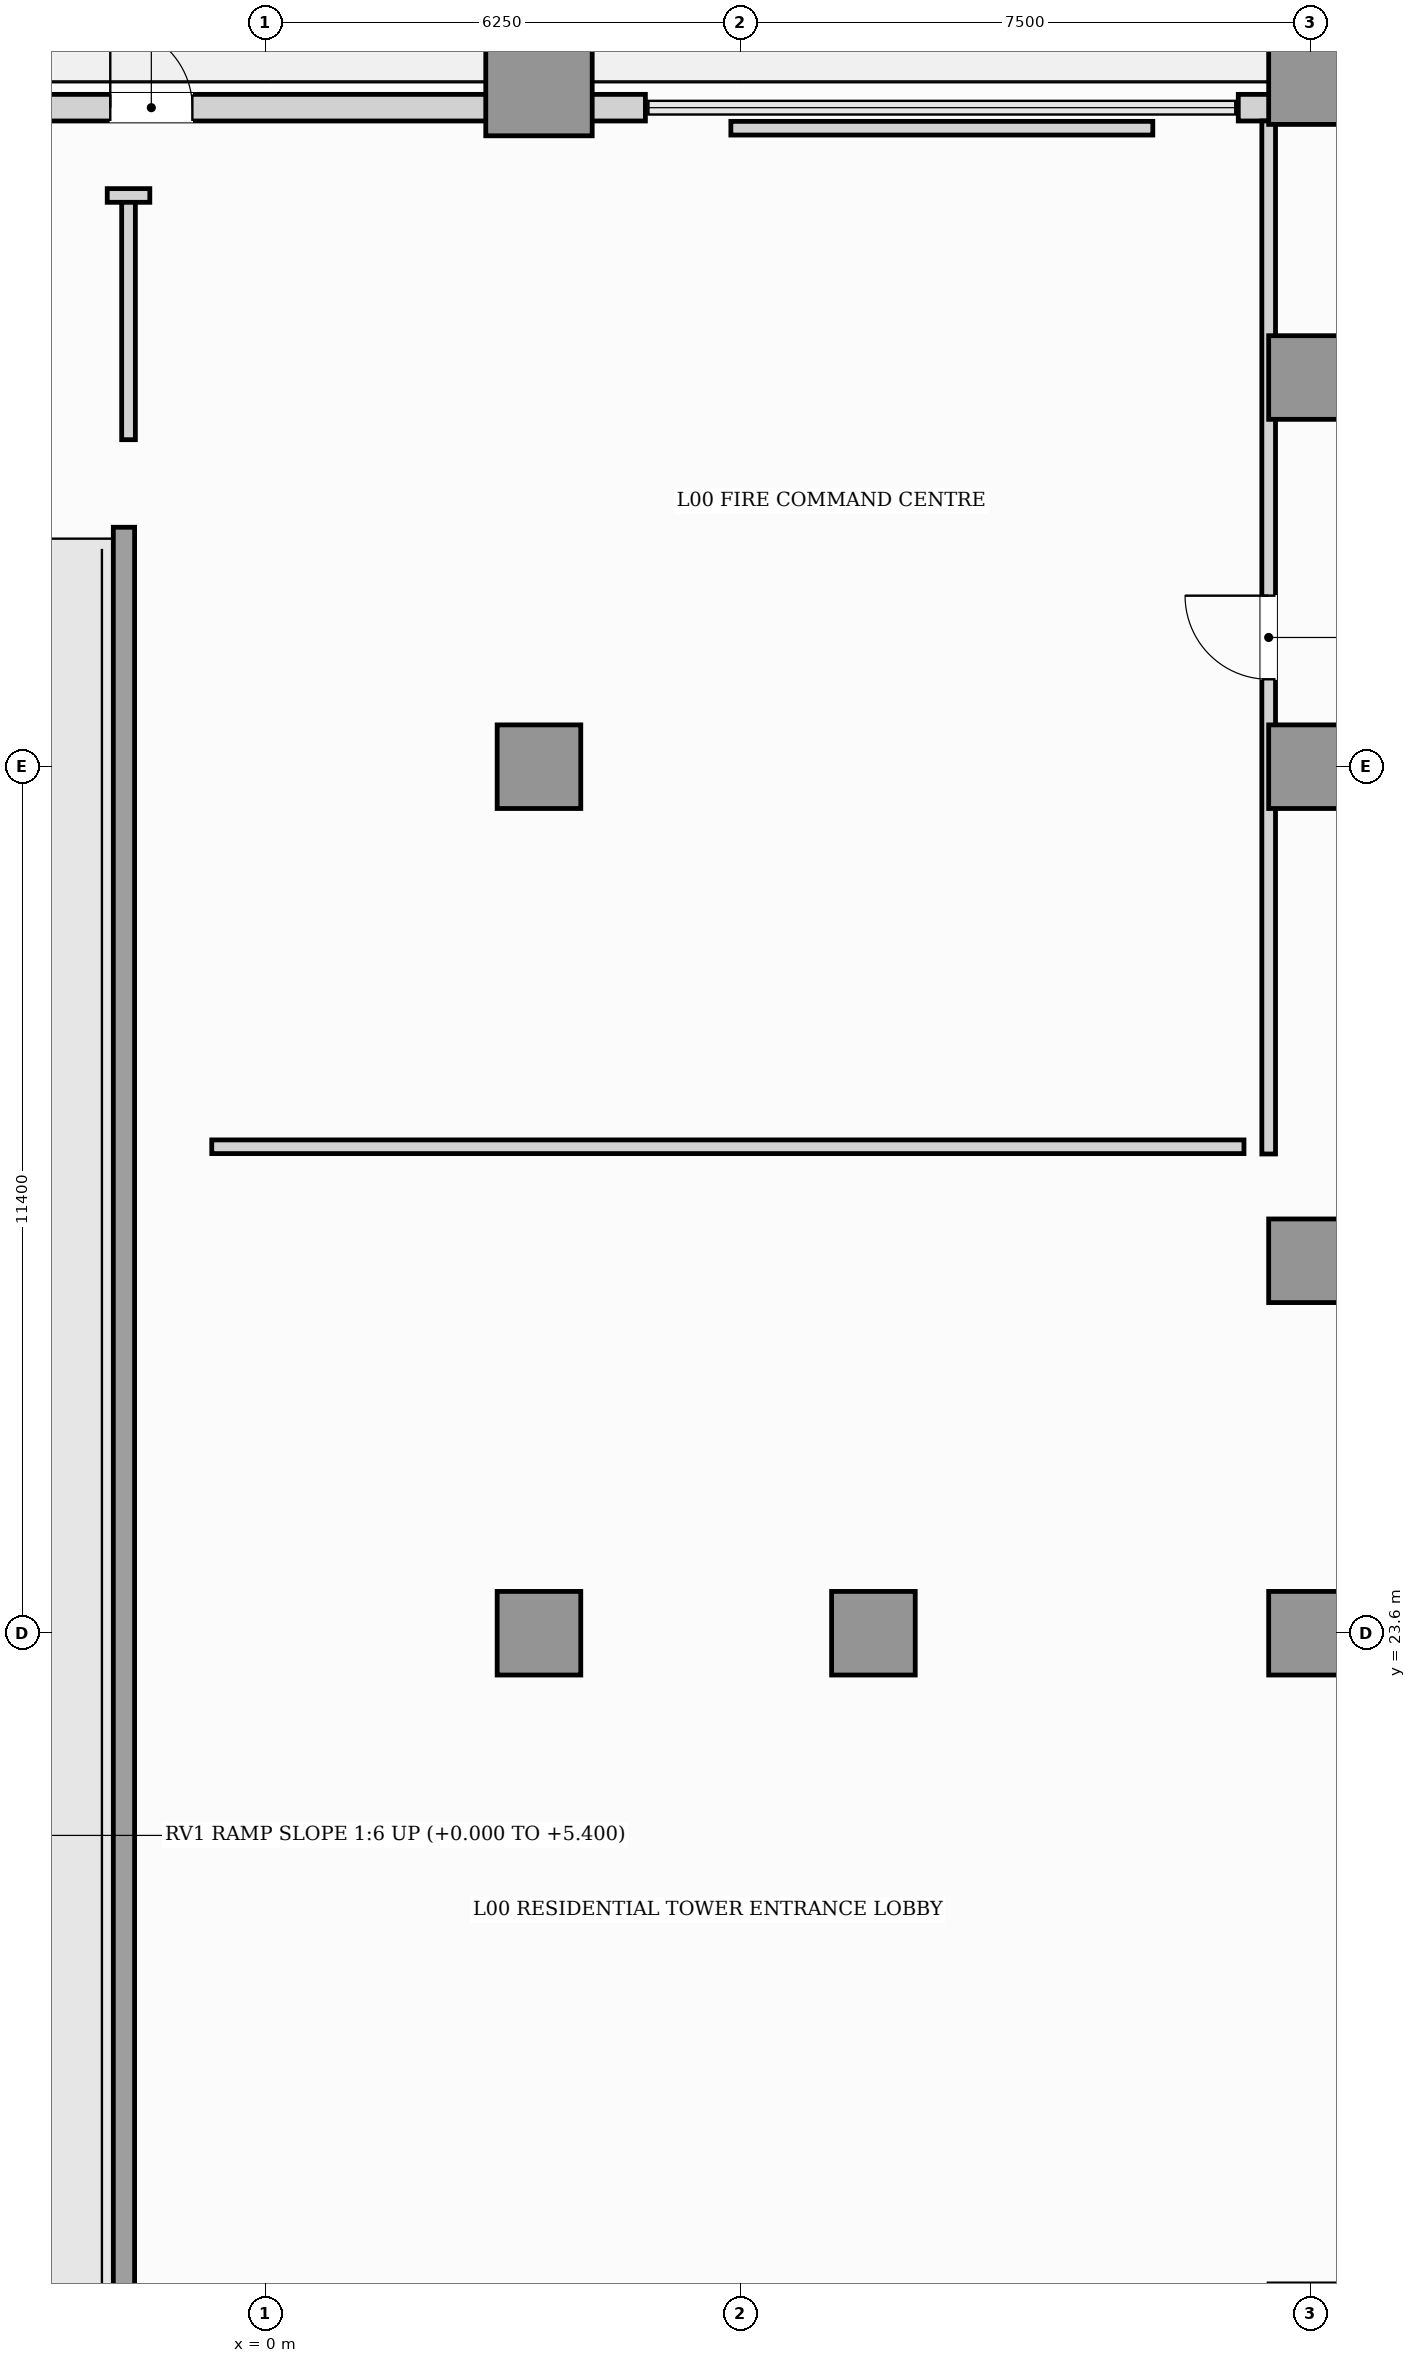
"""IFC4 building model, lengths in metres.
Left out: names, types, materials, properties, quantities, classifications, styles, units other than length and angle.
Written with IfcOpenShell. Run it as: python <this file> out.ifc"""

import sys

from ifc_helpers import new_model, si_unit, direction, frame, frame_2d, origin, origin_2d, place, context, subcontext, project, spatial, rectangle, hollow_rectangle, extrude, element, fill, save


model = new_model("IFC4")
c1 = context("Model", 3, precision=1e-05, world=origin(), true_north=direction((0.0, 1.0)))
c2 = subcontext(c1, "Body", "Model", "MODEL_VIEW")
j1 = project(units=[si_unit("LENGTHUNIT", "METRE"), si_unit("PLANEANGLEUNIT", "RADIAN")], contexts=[c1])
p1 = place(None, origin())
s1 = spatial("IfcSite", under=j1, at=p1, CompositionType="ELEMENT")
p2 = place(p1, origin())
s2 = spatial("IfcBuilding", under=s1, at=p2, CompositionType="ELEMENT")
p3 = place(p2, origin())
s3 = spatial("IfcBuildingStorey", under=s2, at=p3, CompositionType="ELEMENT", Elevation=0.0)
p4 = place(p3, frame((-1.86, 3.88, 0.0), z_axis=(0.0, 0.0, 1.0), x_axis=(0.0, 1.0, 0.0)))
e1 = element("IfcWall", 1, at=p4, inside=s3, PredefinedType="SHEAR", context=c2, shape_type="SweptSolid", body=[
    extrude(rectangle(XDim=34.27, YDim=0.28, at=frame_2d((17.135, 0.0))), origin(), (0.0, 0.0, 1.0), 5.1),
])
p5 = place(p3, frame((3.6, 44.0, 0.0), z_axis=(0.0, 0.0, 1.0), x_axis=(1.0, 0.0, 0.0)))
e2 = element("IfcColumn", 2, at=p5, inside=s3, PredefinedType="USERDEFINED", context=c2, shape_type="SweptSolid", body=[
    extrude(hollow_rectangle(XDim=1.4, YDim=1.4, WallThickness=0.08, at=origin_2d()), origin(), (0.0, 0.0, 1.0), 5.4),
])
for number, where, z_axis, x_axis in (
    (3, (3.6, 23.6, 0.0), (0.0, 0.0, 1.0), (1.0, 0.0, 0.0)),
    (4, (3.6, 35.0, 0.0), (0.0, 0.0, 1.0), (1.0, 0.0, 0.0)),
    (5, (13.75, 23.6, 0.0), (0.0, 0.0, 1.0), (1.0, 0.0, 0.0)),
    (6, (13.75, 35.0, 0.0), (0.0, 0.0, 1.0), (1.0, 0.0, 0.0)),
    (7, (13.75, 44.0, 0.0), (0.0, 0.0, 1.0), (1.0, 0.0, 0.0)),
    (8, (8.0, 23.6, 0.0), (0.0, 0.0, 1.0), (1.0, 0.0, 0.0)),
    (9, (13.75, 28.5, 0.0), (0.0, 0.0, 1.0), (1.0, 0.0, 0.0)),
    (10, (13.75, 40.12, 0.0), (0.0, 0.0, 1.0), (1.0, 0.0, 0.0)),
):
    element("IfcColumn", number, at=place(p3, frame(where, z_axis=z_axis, x_axis=x_axis)), inside=s3, PredefinedType="COLUMN", context=c2, shape_type="SweptSolid", body=[
        extrude(rectangle(XDim=1.1, YDim=1.1, at=origin_2d()), origin(), (0.0, 0.0, 1.0), 5.4),
    ])
p6 = place(p3, frame((-8.06, 43.67, 0.0), z_axis=(0.0, 0.0, 1.0), x_axis=(1.0, 0.0, 0.0)))
e11 = element("IfcWall", 11, at=p6, inside=s3, PredefinedType="SOLIDWALL", context=c2, shape_type="SweptSolid", body=[
    extrude(rectangle(XDim=13.06, YDim=0.35, at=frame_2d((6.53, 0.0))), origin(), (0.0, 0.0, 1.0), 4.2),
])
p7 = place(p6, frame((6.02, 0.0, 0.0)))
e12 = element("IfcOpeningElement", 12, at=p7, cuts=e11, PredefinedType="OPENING", context=c2, shape_type="SweptSolid", body=[
    extrude(rectangle(XDim=1.08, YDim=2.25, at=frame_2d((0.54, 1.125))), frame((0.0, 0.185, 0.0), z_axis=(0.0, -1.0, 0.0), x_axis=(1.0, 0.0, 0.0)), (0.0, 0.0, 1.0), 0.37),
])
p8 = place(p3, frame((12.8, 43.67, 0.0), z_axis=(0.0, 0.0, 1.0), x_axis=(1.0, 0.0, 0.0)))
e13 = element("IfcWall", 13, at=p8, inside=s3, PredefinedType="SOLIDWALL", context=c2, shape_type="SweptSolid", body=[
    extrude(rectangle(XDim=1.9, YDim=0.35, at=frame_2d((0.95, 0.0))), origin(), (0.0, 0.0, 1.0), 4.483),
])
p9 = place(p3, frame((13.2, 29.905, 0.0), z_axis=(0.0, 0.0, 1.0), x_axis=(0.0, 1.0, 0.0)))
e14 = element("IfcWall", 14, at=p9, inside=s3, PredefinedType="PARTITIONING", context=c2, shape_type="SweptSolid", body=[
    extrude(rectangle(XDim=13.59, YDim=0.18, at=frame_2d((6.795, 0.0))), origin(), (0.0, 0.0, 1.0), 5.1),
])
p10 = place(p9, frame((6.245, 0.0, 0.0)))
e15 = element("IfcOpeningElement", 15, at=p10, cuts=e14, PredefinedType="OPENING", context=c2, shape_type="SweptSolid", body=[
    extrude(rectangle(XDim=1.1, YDim=2.2, at=frame_2d((0.55, 1.1))), frame((0.0, 0.1, 0.0), z_axis=(0.0, -1.0, 0.0), x_axis=(1.0, 0.0, 0.0)), (0.0, 0.0, 1.0), 0.2),
])
p11 = place(p3, frame((-0.705, 30.0, 0.0), z_axis=(0.0, 0.0, 1.0), x_axis=(1.0, 0.0, 0.0)))
e16 = element("IfcWall", 16, at=p11, inside=s3, PredefinedType="PARTITIONING", context=c2, shape_type="SweptSolid", body=[
    extrude(rectangle(XDim=13.58, YDim=0.18, at=frame_2d((6.79, 0.0))), origin(), (0.0, 0.0, 1.0), 5.1),
])
p12 = place(p3, frame((11.676, 43.4, 0.0), z_axis=(0.0, 0.0, 1.0), x_axis=(-1.0, 0.0, 0.0)))
e17 = element("IfcWall", 17, at=p12, inside=s3, PredefinedType="PARTITIONING", context=c2, shape_type="SweptSolid", body=[
    extrude(rectangle(XDim=5.551, YDim=0.18, at=frame_2d((2.775, 0.0))), origin(), (0.0, 0.0, 1.0), 5.1),
])
p13 = place(p3, frame((-1.8, 42.515, 0.0), z_axis=(0.0, 0.0, 1.0), x_axis=(0.0, -1.0, 0.0)))
e18 = element("IfcWall", 18, at=p13, inside=s3, PredefinedType="PARTITIONING", context=c2, shape_type="SweptSolid", body=[
    extrude(rectangle(XDim=3.213, YDim=0.18, at=frame_2d((1.606, 0.0))), origin(), (0.0, 0.0, 1.0), 5.1),
])
p14 = place(p3, frame((-1.52, 42.515, 0.0), z_axis=(0.0, 0.0, 1.0), x_axis=(-1.0, 0.0, 0.0)))
e19 = element("IfcWall", 19, at=p14, inside=s3, PredefinedType="PARTITIONING", context=c2, shape_type="SweptSolid", body=[
    extrude(rectangle(XDim=0.56, YDim=0.18, at=frame_2d((0.28, 0.0))), origin(), (0.0, 0.0, 1.0), 5.1),
])
p15 = place(p7, frame((1.08, 0.0, 0.0), z_axis=(0.0, 0.0, 1.0), x_axis=(-1.0, 0.0, 0.0)))
e20 = element("IfcDoor", 20, at=p15, inside=s3, OperationType="SINGLE_SWING_RIGHT", PredefinedType="DOOR", context=c2, shape_type="SweptSolid", body=[
    extrude(rectangle(XDim=1.08, YDim=2.25, at=frame_2d((0.54, 1.125))), frame((0.0, 0.025, 0.0), z_axis=(0.0, -1.0, 0.0), x_axis=(1.0, 0.0, 0.0)), (0.0, 0.0, 1.0), 0.05),
])
fill(e12, e20)
p16 = place(p10, origin())
e21 = element("IfcDoor", 21, at=p16, inside=s3, OperationType="SINGLE_SWING_RIGHT", PredefinedType="DOOR", context=c2, shape_type="SweptSolid", body=[
    extrude(rectangle(XDim=1.1, YDim=2.2, at=frame_2d((0.55, 1.1))), frame((0.0, 0.025, 0.0), z_axis=(0.0, -1.0, 0.0), x_axis=(1.0, 0.0, 0.0)), (0.0, 0.0, 1.0), 0.05),
])
fill(e15, e21)
save(model, sys.argv[1])
